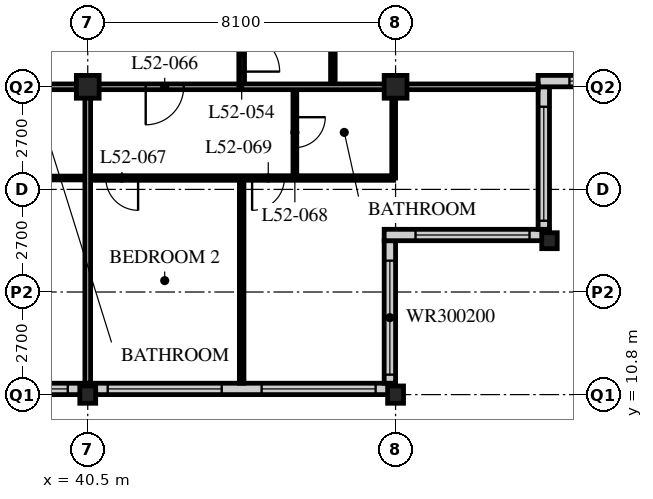
"""IFC4 building model, lengths in metres.
Left out: names, types, materials, properties, quantities, classifications, styles, units other than length and angle.
Written with IfcOpenShell. Run it as: python <this file> out.ifc"""

import sys

from ifc_helpers import new_model, si_unit, direction, frame, frame_2d, origin, origin_2d, place, context, subcontext, project, spatial, rectangle, hollow_rectangle, i_section, extrude, element, fill, save


model = new_model("IFC4")
c1 = context("Model", 3, precision=1e-05, world=origin(), true_north=direction((0.0, 1.0)))
c2 = subcontext(c1, "Body", "Model", "MODEL_VIEW")
j1 = project(units=[si_unit("LENGTHUNIT", "METRE"), si_unit("PLANEANGLEUNIT", "RADIAN")], contexts=[c1])
p1 = place(None, origin())
s1 = spatial("IfcSite", under=j1, at=p1, CompositionType="ELEMENT")
p2 = place(p1, origin())
s2 = spatial("IfcBuilding", under=s1, at=p2, CompositionType="ELEMENT")
p3 = place(p2, frame((0.0, 0.0, 202.8)))
s3 = spatial("IfcBuildingStorey", under=s2, at=p3, CompositionType="ELEMENT", Elevation=202.8)
p4 = place(p3, frame((40.5, 10.8, 0.0), z_axis=(0.0, 0.0, 1.0), x_axis=(1.0, 0.0, 0.0)))
e1 = element("IfcColumn", 1, at=p4, inside=s3, PredefinedType="COLUMN", context=c2, shape_type="SweptSolid", body=[
    extrude(i_section(OverallWidth=0.418, OverallDepth=0.456, WebThickness=0.042, FlangeThickness=0.067, FilletRadius=0.015, at=origin_2d()), origin(), (0.0, 0.0, 1.0), 3.6),
])
p5 = place(p3, frame((40.5, 18.9, 0.0), z_axis=(0.0, 0.0, 1.0), x_axis=(1.0, 0.0, 0.0)))
e2 = element("IfcColumn", 2, at=p5, inside=s3, PredefinedType="COLUMN", context=c2, shape_type="SweptSolid", body=[
    extrude(hollow_rectangle(XDim=0.6, YDim=0.6, WallThickness=0.05, at=origin_2d()), origin(), (0.0, 0.0, 1.0), 3.6),
])
p6 = place(p3, frame((48.6, 10.8, 0.0), z_axis=(0.0, 0.0, 1.0), x_axis=(1.0, 0.0, 0.0)))
e3 = element("IfcColumn", 3, at=p6, inside=s3, PredefinedType="COLUMN", context=c2, shape_type="SweptSolid", body=[
    extrude(i_section(OverallWidth=0.418, OverallDepth=0.456, WebThickness=0.042, FlangeThickness=0.067, FilletRadius=0.015, at=origin_2d()), origin(), (0.0, 0.0, 1.0), 3.6),
])
p7 = place(p3, frame((48.6, 18.9, 0.0), z_axis=(0.0, 0.0, 1.0), x_axis=(1.0, 0.0, 0.0)))
e4 = element("IfcColumn", 4, at=p7, inside=s3, PredefinedType="COLUMN", context=c2, shape_type="SweptSolid", body=[
    extrude(hollow_rectangle(XDim=0.6, YDim=0.6, WallThickness=0.05, at=origin_2d()), origin(), (0.0, 0.0, 1.0), 3.6),
])
p8 = place(p3, frame((52.65, 14.85, 0.0), z_axis=(0.0, 0.0, 1.0), x_axis=(1.0, 0.0, 0.0)))
e5 = element("IfcColumn", 5, at=p8, inside=s3, PredefinedType="COLUMN", context=c2, shape_type="SweptSolid", body=[
    extrude(i_section(OverallWidth=0.407, OverallDepth=0.419, WebThickness=0.031, FlangeThickness=0.049, FilletRadius=0.015, at=origin_2d()), origin(), (0.0, 0.0, 1.0), 3.6),
])
p9 = place(p3, frame((8.4, 10.95, 0.0), z_axis=(0.0, 0.0, 1.0), x_axis=(1.0, 0.0, 0.0)))
e6 = element("IfcWall", 6, at=p9, inside=s3, PredefinedType="SOLIDWALL", context=c2, shape_type="SweptSolid", body=[
    extrude(rectangle(XDim=40.2, YDim=0.3, at=frame_2d((20.1, 0.0))), origin(), (0.0, 0.0, 1.0), 3.39),
])
p10 = place(p9, frame((0.225, 0.0, 0.6)))
e7 = element("IfcOpeningElement", 7, at=p10, cuts=e6, PredefinedType="OPENING", context=c2, shape_type="SweptSolid", body=[
    extrude(rectangle(XDim=3.0, YDim=2.4, at=frame_2d((1.5, 1.2))), frame((0.0, 0.16, 0.0), z_axis=(0.0, -1.0, 0.0), x_axis=(1.0, 0.0, 0.0)), (0.0, 0.0, 1.0), 0.32),
])
p11 = place(p9, frame((4.275, 0.0, 0.6)))
e8 = element("IfcOpeningElement", 8, at=p11, cuts=e6, PredefinedType="OPENING", context=c2, shape_type="SweptSolid", body=[
    extrude(rectangle(XDim=3.0, YDim=2.4, at=frame_2d((1.5, 1.2))), frame((0.0, 0.16, 0.0), z_axis=(0.0, -1.0, 0.0), x_axis=(1.0, 0.0, 0.0)), (0.0, 0.0, 1.0), 0.32),
])
p12 = place(p9, frame((8.325, 0.0, 0.6)))
e9 = element("IfcOpeningElement", 9, at=p12, cuts=e6, PredefinedType="OPENING", context=c2, shape_type="SweptSolid", body=[
    extrude(rectangle(XDim=3.0, YDim=2.4, at=frame_2d((1.5, 1.2))), frame((0.0, 0.16, 0.0), z_axis=(0.0, -1.0, 0.0), x_axis=(1.0, 0.0, 0.0)), (0.0, 0.0, 1.0), 0.32),
])
p13 = place(p9, frame((12.375, 0.0, 0.6)))
e10 = element("IfcOpeningElement", 10, at=p13, cuts=e6, PredefinedType="OPENING", context=c2, shape_type="SweptSolid", body=[
    extrude(rectangle(XDim=3.0, YDim=2.4, at=frame_2d((1.5, 1.2))), frame((0.0, 0.16, 0.0), z_axis=(0.0, -1.0, 0.0), x_axis=(1.0, 0.0, 0.0)), (0.0, 0.0, 1.0), 0.32),
])
p14 = place(p9, frame((16.425, 0.0, 0.6)))
e11 = element("IfcOpeningElement", 11, at=p14, cuts=e6, PredefinedType="OPENING", context=c2, shape_type="SweptSolid", body=[
    extrude(rectangle(XDim=3.0, YDim=2.4, at=frame_2d((1.5, 1.2))), frame((0.0, 0.16, 0.0), z_axis=(0.0, -1.0, 0.0), x_axis=(1.0, 0.0, 0.0)), (0.0, 0.0, 1.0), 0.32),
])
p15 = place(p9, frame((20.475, 0.0, 0.6)))
e12 = element("IfcOpeningElement", 12, at=p15, cuts=e6, PredefinedType="OPENING", context=c2, shape_type="SweptSolid", body=[
    extrude(rectangle(XDim=3.0, YDim=2.4, at=frame_2d((1.5, 1.2))), frame((0.0, 0.16, 0.0), z_axis=(0.0, -1.0, 0.0), x_axis=(1.0, 0.0, 0.0)), (0.0, 0.0, 1.0), 0.32),
])
p16 = place(p9, frame((24.525, 0.0, 0.6)))
e13 = element("IfcOpeningElement", 13, at=p16, cuts=e6, PredefinedType="OPENING", context=c2, shape_type="SweptSolid", body=[
    extrude(rectangle(XDim=3.0, YDim=2.4, at=frame_2d((1.5, 1.2))), frame((0.0, 0.16, 0.0), z_axis=(0.0, -1.0, 0.0), x_axis=(1.0, 0.0, 0.0)), (0.0, 0.0, 1.0), 0.32),
])
p17 = place(p9, frame((28.575, 0.0, 0.6)))
e14 = element("IfcOpeningElement", 14, at=p17, cuts=e6, PredefinedType="OPENING", context=c2, shape_type="SweptSolid", body=[
    extrude(rectangle(XDim=3.0, YDim=2.4, at=frame_2d((1.5, 1.2))), frame((0.0, 0.16, 0.0), z_axis=(0.0, -1.0, 0.0), x_axis=(1.0, 0.0, 0.0)), (0.0, 0.0, 1.0), 0.32),
])
p18 = place(p9, frame((32.625, 0.0, 0.6)))
e15 = element("IfcOpeningElement", 15, at=p18, cuts=e6, PredefinedType="OPENING", context=c2, shape_type="SweptSolid", body=[
    extrude(rectangle(XDim=3.0, YDim=2.4, at=frame_2d((1.5, 1.2))), frame((0.0, 0.16, 0.0), z_axis=(0.0, -1.0, 0.0), x_axis=(1.0, 0.0, 0.0)), (0.0, 0.0, 1.0), 0.32),
])
p19 = place(p9, frame((36.675, 0.0, 0.6)))
e16 = element("IfcOpeningElement", 16, at=p19, cuts=e6, PredefinedType="OPENING", context=c2, shape_type="SweptSolid", body=[
    extrude(rectangle(XDim=3.0, YDim=2.4, at=frame_2d((1.5, 1.2))), frame((0.0, 0.16, 0.0), z_axis=(0.0, -1.0, 0.0), x_axis=(1.0, 0.0, 0.0)), (0.0, 0.0, 1.0), 0.32),
])
p20 = place(p3, frame((48.45, 11.1, 0.0), z_axis=(0.0, 0.0, 1.0), x_axis=(0.0, 1.0, 0.0)))
e17 = element("IfcWall", 17, at=p20, inside=s3, PredefinedType="SOLIDWALL", context=c2, shape_type="SweptSolid", body=[
    extrude(rectangle(XDim=3.75, YDim=0.3, at=frame_2d((1.875, 0.0))), origin(), (0.0, 0.0, 1.0), 3.39),
])
p21 = place(p20, frame((0.225, 0.0, 0.6)))
e18 = element("IfcOpeningElement", 18, at=p21, cuts=e17, PredefinedType="OPENING", context=c2, shape_type="SweptSolid", body=[
    extrude(rectangle(XDim=3.0, YDim=2.0, at=frame_2d((1.5, 1.0))), frame((0.0, 0.16, 0.0), z_axis=(0.0, -1.0, 0.0), x_axis=(1.0, 0.0, 0.0)), (0.0, 0.0, 1.0), 0.32),
])
p22 = place(p3, frame((48.3, 15.0, 0.0), z_axis=(0.0, 0.0, 1.0), x_axis=(1.0, 0.0, 0.0)))
e19 = element("IfcWall", 19, at=p22, inside=s3, PredefinedType="SOLIDWALL", context=c2, shape_type="SweptSolid", body=[
    extrude(rectangle(XDim=4.35, YDim=0.3, at=frame_2d((2.175, 0.0))), origin(), (0.0, 0.0, 1.0), 3.39),
])
p23 = place(p22, frame((0.825, 0.0, 0.6)))
e20 = element("IfcOpeningElement", 20, at=p23, cuts=e19, PredefinedType="OPENING", context=c2, shape_type="SweptSolid", body=[
    extrude(rectangle(XDim=3.0, YDim=2.0, at=frame_2d((1.5, 1.0))), frame((0.0, 0.16, 0.0), z_axis=(0.0, -1.0, 0.0), x_axis=(1.0, 0.0, 0.0)), (0.0, 0.0, 1.0), 0.32),
])
p24 = place(p3, frame((52.5, 15.15, 0.0), z_axis=(0.0, 0.0, 1.0), x_axis=(0.0, 1.0, 0.0)))
e21 = element("IfcWall", 21, at=p24, inside=s3, PredefinedType="SOLIDWALL", context=c2, shape_type="SweptSolid", body=[
    extrude(rectangle(XDim=3.75, YDim=0.3, at=frame_2d((1.875, 0.0))), origin(), (0.0, 0.0, 1.0), 3.39),
])
p25 = place(p24, frame((0.225, 0.0, 0.6)))
e22 = element("IfcOpeningElement", 22, at=p25, cuts=e21, PredefinedType="OPENING", context=c2, shape_type="SweptSolid", body=[
    extrude(rectangle(XDim=3.0, YDim=2.0, at=frame_2d((1.5, 1.0))), frame((0.0, 0.16, 0.0), z_axis=(0.0, -1.0, 0.0), x_axis=(1.0, 0.0, 0.0)), (0.0, 0.0, 1.0), 0.32),
])
p26 = place(p3, frame((52.35, 19.05, 0.0), z_axis=(0.0, 0.0, 1.0), x_axis=(1.0, 0.0, 0.0)))
e23 = element("IfcWall", 23, at=p26, inside=s3, PredefinedType="SOLIDWALL", context=c2, shape_type="SweptSolid", body=[
    extrude(rectangle(XDim=4.35, YDim=0.3, at=frame_2d((2.175, 0.0))), origin(), (0.0, 0.0, 1.0), 3.39),
])
p27 = place(p26, frame((0.825, 0.0, 0.6)))
e24 = element("IfcOpeningElement", 24, at=p27, cuts=e23, PredefinedType="OPENING", context=c2, shape_type="SweptSolid", body=[
    extrude(rectangle(XDim=3.0, YDim=2.0, at=frame_2d((1.5, 1.0))), frame((0.0, 0.16, 0.0), z_axis=(0.0, -1.0, 0.0), x_axis=(1.0, 0.0, 0.0)), (0.0, 0.0, 1.0), 0.32),
])
p28 = place(p3, frame((8.1, 18.9, 0.0), z_axis=(0.0, 0.0, 1.0), x_axis=(1.0, 0.0, 0.0)))
e25 = element("IfcWall", 25, at=p28, inside=s3, PredefinedType="PARTITIONING", context=c2, shape_type="SweptSolid", body=[
    extrude(rectangle(XDim=36.45, YDim=0.15, at=frame_2d((18.225, 0.0))), origin(), (0.0, 0.0, 1.0), 2.778),
])
p29 = place(p28, frame((4.45, 0.0, 0.0)))
e26 = element("IfcOpeningElement", 26, at=p29, cuts=e25, PredefinedType="OPENING", context=c2, shape_type="SweptSolid", body=[
    extrude(rectangle(XDim=1.0, YDim=2.1, at=frame_2d((0.5, 1.05))), frame((0.0, 0.085, 0.0), z_axis=(0.0, -1.0, 0.0), x_axis=(1.0, 0.0, 0.0)), (0.0, 0.0, 1.0), 0.17),
])
p30 = place(p28, frame((12.55, 0.0, 0.0)))
e27 = element("IfcOpeningElement", 27, at=p30, cuts=e25, PredefinedType="OPENING", context=c2, shape_type="SweptSolid", body=[
    extrude(rectangle(XDim=1.0, YDim=2.1, at=frame_2d((0.5, 1.05))), frame((0.0, 0.085, 0.0), z_axis=(0.0, -1.0, 0.0), x_axis=(1.0, 0.0, 0.0)), (0.0, 0.0, 1.0), 0.17),
])
p31 = place(p28, frame((29.05, 0.0, 0.0)))
e28 = element("IfcOpeningElement", 28, at=p31, cuts=e25, PredefinedType="OPENING", context=c2, shape_type="SweptSolid", body=[
    extrude(rectangle(XDim=1.0, YDim=2.1, at=frame_2d((0.5, 1.05))), frame((0.0, 0.085, 0.0), z_axis=(0.0, -1.0, 0.0), x_axis=(1.0, 0.0, 0.0)), (0.0, 0.0, 1.0), 0.17),
])
p32 = place(p28, frame((2.625, 0.0, 0.0)))
e29 = element("IfcOpeningElement", 29, at=p32, cuts=e25, PredefinedType="OPENING", context=c2, shape_type="SweptSolid", body=[
    extrude(rectangle(XDim=1.0, YDim=2.1, at=frame_2d((0.5, 1.05))), frame((0.0, 0.085, 0.0), z_axis=(0.0, -1.0, 0.0), x_axis=(1.0, 0.0, 0.0)), (0.0, 0.0, 1.0), 0.17),
])
p33 = place(p28, frame((33.925, 0.0, 0.0)))
e30 = element("IfcOpeningElement", 30, at=p33, cuts=e25, PredefinedType="OPENING", context=c2, shape_type="SweptSolid", body=[
    extrude(rectangle(XDim=1.0, YDim=2.1, at=frame_2d((0.5, 1.05))), frame((0.0, 0.085, 0.0), z_axis=(0.0, -1.0, 0.0), x_axis=(1.0, 0.0, 0.0)), (0.0, 0.0, 1.0), 0.17),
])
p34 = place(p3, frame((44.55, 18.9, 0.0), z_axis=(0.0, 0.0, 1.0), x_axis=(0.0, 1.0, 0.0)))
e31 = element("IfcWall", 31, at=p34, inside=s3, PredefinedType="PARTITIONING", context=c2, shape_type="SweptSolid", body=[
    extrude(rectangle(XDim=28.35, YDim=0.15, at=frame_2d((14.175, 0.0))), origin(), (0.0, 0.0, 1.0), 3.39),
])
p35 = place(p34, frame((0.4, 0.0, 0.0)))
e32 = element("IfcOpeningElement", 32, at=p35, cuts=e31, PredefinedType="OPENING", context=c2, shape_type="SweptSolid", body=[
    extrude(rectangle(XDim=1.0, YDim=2.1, at=frame_2d((0.5, 1.05))), frame((0.0, 0.085, 0.0), z_axis=(0.0, -1.0, 0.0), x_axis=(1.0, 0.0, 0.0)), (0.0, 0.0, 1.0), 0.17),
])
p36 = place(p34, frame((12.55, 0.0, 0.0)))
e33 = element("IfcOpeningElement", 33, at=p36, cuts=e31, PredefinedType="OPENING", context=c2, shape_type="SweptSolid", body=[
    extrude(rectangle(XDim=1.0, YDim=2.1, at=frame_2d((0.5, 1.05))), frame((0.0, 0.085, 0.0), z_axis=(0.0, -1.0, 0.0), x_axis=(1.0, 0.0, 0.0)), (0.0, 0.0, 1.0), 0.17),
])
p37 = place(p34, frame((26.65, 0.0, 0.0)))
e34 = element("IfcOpeningElement", 34, at=p37, cuts=e31, PredefinedType="OPENING", context=c2, shape_type="SweptSolid", body=[
    extrude(rectangle(XDim=1.0, YDim=2.1, at=frame_2d((0.5, 1.05))), frame((0.0, 0.085, 0.0), z_axis=(0.0, -1.0, 0.0), x_axis=(1.0, 0.0, 0.0)), (0.0, 0.0, 1.0), 0.17),
])
p38 = place(p3, frame((38.3, 16.5, 0.0), z_axis=(0.0, 0.0, 1.0), x_axis=(1.0, 0.0, 0.0)))
e35 = element("IfcWall", 35, at=p38, inside=s3, PredefinedType="PARTITIONING", context=c2, shape_type="SweptSolid", body=[
    extrude(rectangle(XDim=2.2, YDim=0.1, at=frame_2d((1.1, 0.0))), origin(), (0.0, 0.0, 1.0), 3.39),
])
p39 = place(p3, frame((46.95, 18.9, 0.0), z_axis=(0.0, 0.0, 1.0), x_axis=(0.0, 1.0, 0.0)))
e36 = element("IfcWall", 36, at=p39, inside=s3, PredefinedType="PARTITIONING", context=c2, shape_type="SweptSolid", body=[
    extrude(rectangle(XDim=24.3, YDim=0.12, at=frame_2d((12.15, 0.0))), origin(), (0.0, 0.0, 1.0), 3.39),
])
p40 = place(p39, frame((0.975, 0.0, 0.0)))
e37 = element("IfcOpeningElement", 37, at=p40, cuts=e36, PredefinedType="OPENING", context=c2, shape_type="SweptSolid", body=[
    extrude(rectangle(XDim=0.85, YDim=2.1, at=frame_2d((0.425, 1.05))), frame((0.0, 0.07, 0.0), z_axis=(0.0, -1.0, 0.0), x_axis=(1.0, 0.0, 0.0)), (0.0, 0.0, 1.0), 0.14),
])
p41 = place(p39, frame((8.425, 0.0, 0.0)))
e38 = element("IfcOpeningElement", 38, at=p41, cuts=e36, PredefinedType="OPENING", context=c2, shape_type="SweptSolid", body=[
    extrude(rectangle(XDim=0.85, YDim=2.1, at=frame_2d((0.425, 1.05))), frame((0.0, 0.07, 0.0), z_axis=(0.0, -1.0, 0.0), x_axis=(1.0, 0.0, 0.0)), (0.0, 0.0, 1.0), 0.14),
])
p42 = place(p39, frame((13.125, 0.0, 0.0)))
e39 = element("IfcOpeningElement", 39, at=p42, cuts=e36, PredefinedType="OPENING", context=c2, shape_type="SweptSolid", body=[
    extrude(rectangle(XDim=0.85, YDim=2.1, at=frame_2d((0.425, 1.05))), frame((0.0, 0.07, 0.0), z_axis=(0.0, -1.0, 0.0), x_axis=(1.0, 0.0, 0.0)), (0.0, 0.0, 1.0), 0.14),
])
p43 = place(p39, frame((20.575, 0.0, 0.0)))
e40 = element("IfcOpeningElement", 40, at=p43, cuts=e36, PredefinedType="OPENING", context=c2, shape_type="SweptSolid", body=[
    extrude(rectangle(XDim=0.85, YDim=2.1, at=frame_2d((0.425, 1.05))), frame((0.0, 0.07, 0.0), z_axis=(0.0, -1.0, 0.0), x_axis=(1.0, 0.0, 0.0)), (0.0, 0.0, 1.0), 0.14),
])
p44 = place(p3, frame((40.5, 16.5, 0.0), z_axis=(0.0, 0.0, 1.0), x_axis=(1.0, 0.0, 0.0)))
e41 = element("IfcWall", 41, at=p44, inside=s3, PredefinedType="PARTITIONING", context=c2, shape_type="SweptSolid", body=[
    extrude(rectangle(XDim=8.05, YDim=0.12, at=frame_2d((4.025, 0.0))), origin(), (0.0, 0.0, 1.0), 3.39),
])
p45 = place(p44, frame((0.475, 0.0, 0.0)))
e42 = element("IfcOpeningElement", 42, at=p45, cuts=e41, PredefinedType="OPENING", context=c2, shape_type="SweptSolid", body=[
    extrude(rectangle(XDim=0.85, YDim=2.1, at=frame_2d((0.425, 1.05))), frame((0.0, 0.07, 0.0), z_axis=(0.0, -1.0, 0.0), x_axis=(1.0, 0.0, 0.0)), (0.0, 0.0, 1.0), 0.14),
])
p46 = place(p44, frame((4.325, 0.0, 0.0)))
e43 = element("IfcOpeningElement", 43, at=p46, cuts=e41, PredefinedType="OPENING", context=c2, shape_type="SweptSolid", body=[
    extrude(rectangle(XDim=0.85, YDim=2.1, at=frame_2d((0.425, 1.05))), frame((0.0, 0.07, 0.0), z_axis=(0.0, -1.0, 0.0), x_axis=(1.0, 0.0, 0.0)), (0.0, 0.0, 1.0), 0.14),
])
p47 = place(p3, frame((45.95, 18.9, 0.0), z_axis=(0.0, 0.0, 1.0), x_axis=(0.0, -1.0, 0.0)))
e44 = element("IfcWall", 44, at=p47, inside=s3, PredefinedType="PARTITIONING", context=c2, shape_type="SweptSolid", body=[
    extrude(rectangle(XDim=2.4, YDim=0.1, at=frame_2d((1.2, 0.0))), origin(), (0.0, 0.0, 1.0), 3.39),
])
p48 = place(p47, frame((0.8, 0.0, 0.0)))
e45 = element("IfcOpeningElement", 45, at=p48, cuts=e44, PredefinedType="OPENING", context=c2, shape_type="SweptSolid", body=[
    extrude(rectangle(XDim=0.8, YDim=2.1, at=frame_2d((0.4, 1.05))), frame((0.0, 0.06, 0.0), z_axis=(0.0, -1.0, 0.0), x_axis=(1.0, 0.0, 0.0)), (0.0, 0.0, 1.0), 0.12),
])
p49 = place(p3, frame((48.55, 18.9, 0.0), z_axis=(0.0, 0.0, 1.0), x_axis=(0.0, -1.0, 0.0)))
e46 = element("IfcWall", 46, at=p49, inside=s3, PredefinedType="PARTITIONING", context=c2, shape_type="SweptSolid", body=[
    extrude(rectangle(XDim=2.4, YDim=0.1, at=frame_2d((1.2, 0.0))), origin(), (0.0, 0.0, 1.0), 2.778),
])
p50 = place(p3, frame((44.55, 16.5, 0.0), z_axis=(0.0, 0.0, 1.0), x_axis=(0.0, -1.0, 0.0)))
e47 = element("IfcWall", 47, at=p50, inside=s3, PredefinedType="PARTITIONING", context=c2, shape_type="SweptSolid", body=[
    extrude(rectangle(XDim=5.4, YDim=0.12, at=frame_2d((2.7, 0.0))), origin(), (0.0, 0.0, 1.0), 3.39),
])
p51 = place(p3, frame((44.55, 18.9, 0.0), z_axis=(0.0, 0.0, 1.0), x_axis=(1.0, 0.0, 0.0)))
e48 = element("IfcWall", 48, at=p51, inside=s3, PredefinedType="PARTITIONING", context=c2, shape_type="SweptSolid", body=[
    extrude(rectangle(XDim=7.8, YDim=0.15, at=frame_2d((3.9, 0.0))), origin(), (0.0, 0.0, 1.0), 2.778),
])
p52 = place(p3, frame((40.5, 18.9, 0.0), z_axis=(0.0, 0.0, 1.0), x_axis=(0.0, -1.0, 0.0)))
e49 = element("IfcWall", 49, at=p52, inside=s3, PredefinedType="PARTITIONING", context=c2, shape_type="SweptSolid", body=[
    extrude(rectangle(XDim=7.8, YDim=0.15, at=frame_2d((3.9, 0.0))), origin(), (0.0, 0.0, 1.0), 2.778),
])
p53 = place(p17, origin())
e50 = element("IfcWindow", 50, at=p53, inside=s3, PartitioningType="SINGLE_PANEL", PredefinedType="WINDOW", context=c2, shape_type="SweptSolid", body=[
    extrude(rectangle(XDim=3.0, YDim=2.4, at=frame_2d((1.5, 1.2))), frame((0.0, 0.03, 0.0), z_axis=(0.0, -1.0, 0.0), x_axis=(1.0, 0.0, 0.0)), (0.0, 0.0, 1.0), 0.06),
])
fill(e14, e50)
p54 = place(p18, origin())
e51 = element("IfcWindow", 51, at=p54, inside=s3, PartitioningType="SINGLE_PANEL", PredefinedType="WINDOW", context=c2, shape_type="SweptSolid", body=[
    extrude(rectangle(XDim=3.0, YDim=2.4, at=frame_2d((1.5, 1.2))), frame((0.0, 0.03, 0.0), z_axis=(0.0, -1.0, 0.0), x_axis=(1.0, 0.0, 0.0)), (0.0, 0.0, 1.0), 0.06),
])
fill(e15, e51)
p55 = place(p19, origin())
e52 = element("IfcWindow", 52, at=p55, inside=s3, PartitioningType="SINGLE_PANEL", PredefinedType="WINDOW", context=c2, shape_type="SweptSolid", body=[
    extrude(rectangle(XDim=3.0, YDim=2.4, at=frame_2d((1.5, 1.2))), frame((0.0, 0.03, 0.0), z_axis=(0.0, -1.0, 0.0), x_axis=(1.0, 0.0, 0.0)), (0.0, 0.0, 1.0), 0.06),
])
fill(e16, e52)
p56 = place(p21, origin())
e53 = element("IfcWindow", 53, at=p56, inside=s3, PartitioningType="SINGLE_PANEL", PredefinedType="WINDOW", context=c2, shape_type="SweptSolid", body=[
    extrude(rectangle(XDim=3.0, YDim=2.0, at=frame_2d((1.5, 1.0))), frame((0.0, 0.03, 0.0), z_axis=(0.0, -1.0, 0.0), x_axis=(1.0, 0.0, 0.0)), (0.0, 0.0, 1.0), 0.06),
])
fill(e18, e53)
p57 = place(p23, origin())
e54 = element("IfcWindow", 54, at=p57, inside=s3, PartitioningType="SINGLE_PANEL", PredefinedType="WINDOW", context=c2, shape_type="SweptSolid", body=[
    extrude(rectangle(XDim=3.0, YDim=2.0, at=frame_2d((1.5, 1.0))), frame((0.0, 0.03, 0.0), z_axis=(0.0, -1.0, 0.0), x_axis=(1.0, 0.0, 0.0)), (0.0, 0.0, 1.0), 0.06),
])
fill(e20, e54)
p58 = place(p25, origin())
e55 = element("IfcWindow", 55, at=p58, inside=s3, PartitioningType="SINGLE_PANEL", PredefinedType="WINDOW", context=c2, shape_type="SweptSolid", body=[
    extrude(rectangle(XDim=3.0, YDim=2.0, at=frame_2d((1.5, 1.0))), frame((0.0, 0.03, 0.0), z_axis=(0.0, -1.0, 0.0), x_axis=(1.0, 0.0, 0.0)), (0.0, 0.0, 1.0), 0.06),
])
fill(e22, e55)
p59 = place(p27, origin())
e56 = element("IfcWindow", 56, at=p59, inside=s3, PartitioningType="SINGLE_PANEL", PredefinedType="WINDOW", context=c2, shape_type="SweptSolid", body=[
    extrude(rectangle(XDim=3.0, YDim=2.0, at=frame_2d((1.5, 1.0))), frame((0.0, 0.03, 0.0), z_axis=(0.0, -1.0, 0.0), x_axis=(1.0, 0.0, 0.0)), (0.0, 0.0, 1.0), 0.06),
])
fill(e24, e56)
p60 = place(p35, origin())
e57 = element("IfcDoor", 57, at=p60, inside=s3, OperationType="SINGLE_SWING_RIGHT", PredefinedType="DOOR", context=c2, shape_type="SweptSolid", body=[
    extrude(rectangle(XDim=1.0, YDim=2.1, at=frame_2d((0.5, 1.05))), frame((0.0, 0.025, 0.0), z_axis=(0.0, -1.0, 0.0), x_axis=(1.0, 0.0, 0.0)), (0.0, 0.0, 1.0), 0.05),
])
fill(e32, e57)
p61 = place(p33, origin())
e58 = element("IfcDoor", 58, at=p61, inside=s3, OperationType="SINGLE_SWING_RIGHT", PredefinedType="DOOR", context=c2, shape_type="SweptSolid", body=[
    extrude(rectangle(XDim=1.0, YDim=2.1, at=frame_2d((0.5, 1.05))), frame((0.0, 0.025, 0.0), z_axis=(0.0, -1.0, 0.0), x_axis=(1.0, 0.0, 0.0)), (0.0, 0.0, 1.0), 0.05),
])
fill(e30, e58)
p62 = place(p45, origin())
e59 = element("IfcDoor", 59, at=p62, inside=s3, OperationType="SINGLE_SWING_LEFT", PredefinedType="DOOR", context=c2, shape_type="SweptSolid", body=[
    extrude(rectangle(XDim=0.85, YDim=2.1, at=frame_2d((0.425, 1.05))), frame((0.0, 0.025, 0.0), z_axis=(0.0, -1.0, 0.0), x_axis=(1.0, 0.0, 0.0)), (0.0, 0.0, 1.0), 0.05),
])
fill(e42, e59)
p63 = place(p48, origin())
e60 = element("IfcDoor", 60, at=p63, inside=s3, OperationType="SINGLE_SWING_LEFT", PredefinedType="DOOR", context=c2, shape_type="SweptSolid", body=[
    extrude(rectangle(XDim=0.8, YDim=2.1, at=frame_2d((0.4, 1.05))), frame((0.0, 0.025, 0.0), z_axis=(0.0, -1.0, 0.0), x_axis=(1.0, 0.0, 0.0)), (0.0, 0.0, 1.0), 0.05),
])
fill(e45, e60)
p64 = place(p46, origin())
e61 = element("IfcDoor", 61, at=p64, inside=s3, OperationType="SINGLE_SWING_RIGHT", PredefinedType="DOOR", context=c2, shape_type="SweptSolid", body=[
    extrude(rectangle(XDim=0.85, YDim=2.1, at=frame_2d((0.425, 1.05))), frame((0.0, 0.025, 0.0), z_axis=(0.0, -1.0, 0.0), x_axis=(1.0, 0.0, 0.0)), (0.0, 0.0, 1.0), 0.05),
])
fill(e43, e61)
save(model, sys.argv[1])
